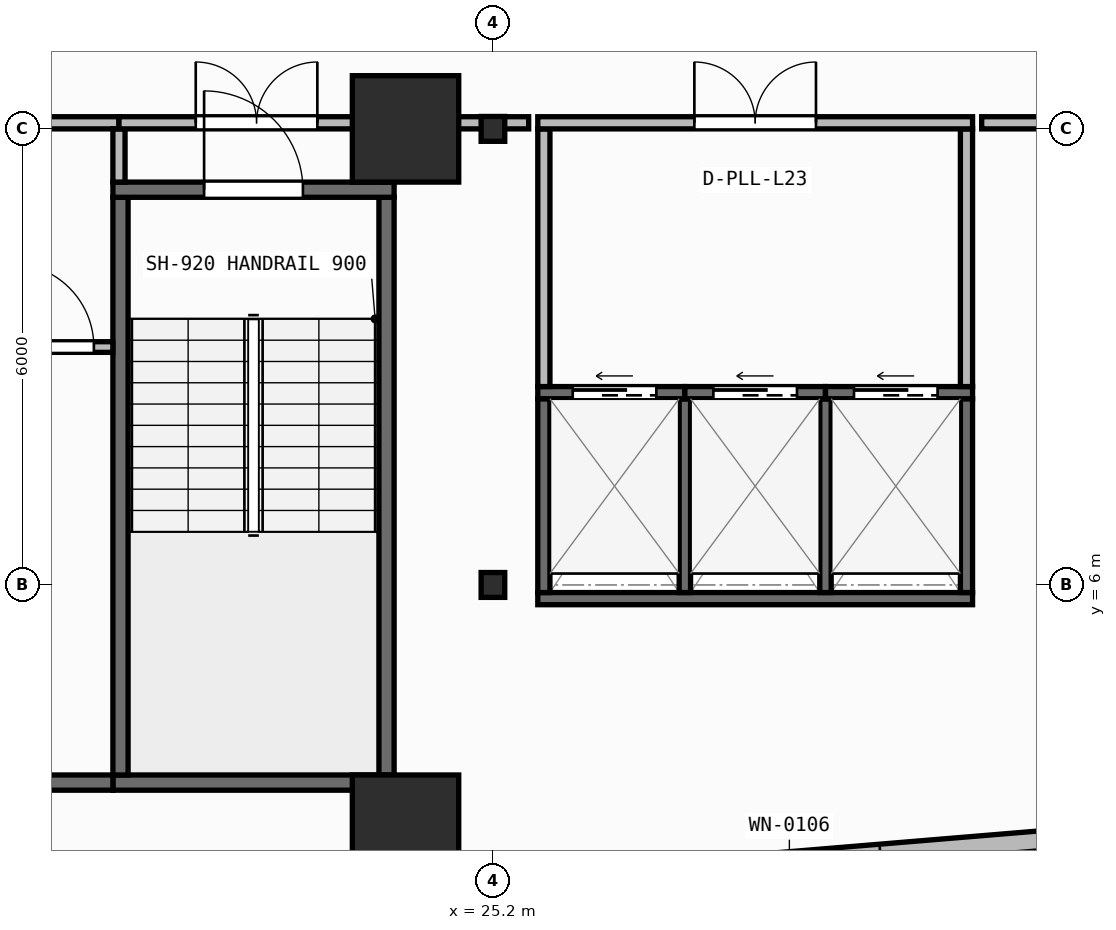
"""IFC4 building model, lengths in metres.
Left out: names, types, materials, properties, quantities, classifications, styles, units other than length and angle.
Written with IfcOpenShell. Run it as: python <this file> out.ifc"""

import sys

from ifc_helpers import new_model, si_unit, direction, frame, frame_2d, origin, origin_2d, place, context, subcontext, project, spatial, rectangle, i_section, extrude, element, fill, save


model = new_model("IFC4")
c1 = context("Model", 3, precision=1e-05, world=origin(), true_north=direction((0.0, 1.0)))
c2 = subcontext(c1, "Body", "Model", "MODEL_VIEW")
j1 = project(units=[si_unit("LENGTHUNIT", "METRE"), si_unit("PLANEANGLEUNIT", "RADIAN")], contexts=[c1])
p1 = place(None, origin())
s1 = spatial("IfcSite", under=j1, at=p1, CompositionType="ELEMENT")
p2 = place(p1, origin())
s2 = spatial("IfcBuilding", under=s1, at=p2, CompositionType="ELEMENT")
p3 = place(p2, frame((0.0, 0.0, 93.6)))
s3 = spatial("IfcBuildingStorey", under=s2, at=p3, CompositionType="ELEMENT", Elevation=93.6)
p4 = place(p3, frame((24.05, 2.8, 0.0), z_axis=(0.0, 0.0, 1.0), x_axis=(1.0, 0.0, 0.0)))
e1 = element("IfcColumn", 1, at=p4, inside=s3, PredefinedType="COLUMN", context=c2, shape_type="SweptSolid", body=[
    extrude(rectangle(XDim=1.4, YDim=1.4, at=origin_2d()), origin(), (0.0, 0.0, 1.0), 3.95),
])
p5 = place(p3, frame((25.2, 6.0, 0.0), z_axis=(0.0, 0.0, 1.0), x_axis=(1.0, 0.0, 0.0)))
e2 = element("IfcColumn", 2, at=p5, inside=s3, PredefinedType="COLUMN", context=c2, shape_type="SweptSolid", body=[
    extrude(i_section(OverallWidth=0.311, OverallDepth=0.327, WebThickness=0.016, FlangeThickness=0.025, FilletRadius=0.017, at=origin_2d()), origin(), (0.0, 0.0, 1.0), 3.95),
])
p6 = place(p3, frame((24.05, 12.0, 0.0), z_axis=(0.0, 0.0, 1.0), x_axis=(1.0, 0.0, 0.0)))
e3 = element("IfcColumn", 3, at=p6, inside=s3, PredefinedType="COLUMN", context=c2, shape_type="SweptSolid", body=[
    extrude(rectangle(XDim=1.4, YDim=1.4, at=origin_2d()), origin(), (0.0, 0.0, 1.0), 3.95),
])
p7 = place(p3, frame((25.2, 12.0, 0.0), z_axis=(0.0, 0.0, 1.0), x_axis=(1.0, 0.0, 0.0)))
e4 = element("IfcColumn", 4, at=p7, inside=s3, PredefinedType="COLUMN", context=c2, shape_type="SweptSolid", body=[
    extrude(i_section(OverallWidth=0.311, OverallDepth=0.327, WebThickness=0.016, FlangeThickness=0.025, FilletRadius=0.017, at=origin_2d()), origin(), (0.0, 0.0, 1.0), 3.95),
])
p8 = place(p3, frame((2.76, 0.174, 0.0), z_axis=(0.0, 0.0, 1.0), x_axis=(0.996571478456, 0.082736257641, 0.0)))
e5 = element("IfcWall", 5, at=p8, inside=s3, PredefinedType="STANDARD", context=c2, shape_type="SweptSolid", body=[
    extrude(rectangle(XDim=52.861, YDim=0.26, at=frame_2d((26.431, 0.0))), origin(), (0.0, 0.0, 1.0), 3.67),
])
p9 = place(p8, frame((25.231, 0.0, 0.9)))
e6 = element("IfcOpeningElement", 6, at=p9, cuts=e5, PredefinedType="OPENING", context=c2, shape_type="SweptSolid", body=[
    extrude(rectangle(XDim=2.4, YDim=1.65, at=frame_2d((1.2, 0.825))), frame((0.0, 0.14, 0.0), z_axis=(0.0, -1.0, 0.0), x_axis=(1.0, 0.0, 0.0)), (0.0, 0.0, 1.0), 0.28),
])
p10 = place(p3, frame((20.2, 3.4, 0.0), z_axis=(0.0, 0.0, 1.0), x_axis=(1.0, 0.0, 0.0)))
e7 = element("IfcWall", 7, at=p10, inside=s3, PredefinedType="SHEAR", context=c2, shape_type="SweptSolid", body=[
    extrude(rectangle(XDim=3.7, YDim=0.2, at=frame_2d((1.85, 0.0))), origin(), (0.0, 0.0, 1.0), 3.67),
])
for number, where, z_axis, x_axis in (
    (8, (20.3, 3.5, 0.0), (0.0, 0.0, 1.0), (0.0, 1.0, 0.0)),
    (9, (23.8, 3.5, 0.0), (0.0, 0.0, 1.0), (0.0, 1.0, 0.0)),
):
    element("IfcWall", number, at=place(p3, frame(where, z_axis=z_axis, x_axis=x_axis)), inside=s3, PredefinedType="SHEAR", context=c2, shape_type="SweptSolid", body=[
        extrude(rectangle(XDim=7.6, YDim=0.2, at=frame_2d((3.8, 0.0))), origin(), (0.0, 0.0, 1.0), 3.67),
    ])
p11 = place(p3, frame((20.2, 11.2, 0.0), z_axis=(0.0, 0.0, 1.0), x_axis=(1.0, 0.0, 0.0)))
e10 = element("IfcWall", 10, at=p11, inside=s3, PredefinedType="SHEAR", context=c2, shape_type="SweptSolid", body=[
    extrude(rectangle(XDim=3.7, YDim=0.2, at=frame_2d((1.85, 0.0))), origin(), (0.0, 0.0, 1.0), 3.67),
])
p12 = place(p11, frame((1.2, 0.0, 0.0)))
e11 = element("IfcOpeningElement", 11, at=p12, cuts=e10, PredefinedType="OPENING", context=c2, shape_type="SweptSolid", body=[
    extrude(rectangle(XDim=1.3, YDim=2.15, at=frame_2d((0.65, 1.075))), frame((0.0, 0.11, 0.0), z_axis=(0.0, -1.0, 0.0), x_axis=(1.0, 0.0, 0.0)), (0.0, 0.0, 1.0), 0.22),
])
p13 = place(p3, frame((6.5, 3.4, 0.0), z_axis=(0.0, 0.0, 1.0), x_axis=(1.0, 0.0, 0.0)))
e12 = element("IfcWall", 12, at=p13, inside=s3, PredefinedType="SHEAR", context=c2, shape_type="SweptSolid", body=[
    extrude(rectangle(XDim=13.7, YDim=0.2, at=frame_2d((6.85, 0.0))), origin(), (0.0, 0.0, 1.0), 3.67),
])
p14 = place(p3, frame((25.79, 5.82, 0.0), z_axis=(0.0, 0.0, 1.0), x_axis=(1.0, 0.0, 0.0)))
e13 = element("IfcWall", 13, at=p14, inside=s3, PredefinedType="SHEAR", context=c2, shape_type="SweptSolid", body=[
    extrude(rectangle(XDim=5.72, YDim=0.16, at=frame_2d((2.86, 0.0))), origin(), (0.0, 0.0, 1.0), 3.67),
])
for number, where, z_axis, x_axis in (
    (14, (25.87, 5.9, 0.0), (0.0, 0.0, 1.0), (0.0, 1.0, 0.0)),
    (15, (31.43, 5.9, 0.0), (0.0, 0.0, 1.0), (0.0, 1.0, 0.0)),
):
    element("IfcWall", number, at=place(p3, frame(where, z_axis=z_axis, x_axis=x_axis)), inside=s3, PredefinedType="SHEAR", context=c2, shape_type="SweptSolid", body=[
        extrude(rectangle(XDim=2.55, YDim=0.16, at=frame_2d((1.275, 0.0))), origin(), (0.0, 0.0, 1.0), 3.67),
    ])
for number, where, z_axis, x_axis in (
    (16, (27.725, 5.9, 0.0), (0.0, 0.0, 1.0), (0.0, 1.0, 0.0)),
    (17, (29.575, 5.9, 0.0), (0.0, 0.0, 1.0), (0.0, 1.0, 0.0)),
):
    element("IfcWall", number, at=place(p3, frame(where, z_axis=z_axis, x_axis=x_axis)), inside=s3, PredefinedType="SHEAR", context=c2, shape_type="SweptSolid", body=[
        extrude(rectangle(XDim=2.55, YDim=0.15, at=frame_2d((1.275, 0.0))), origin(), (0.0, 0.0, 1.0), 3.67),
    ])
p15 = place(p3, frame((25.79, 8.53, 0.0), z_axis=(0.0, 0.0, 1.0), x_axis=(1.0, 0.0, 0.0)))
e18 = element("IfcWall", 18, at=p15, inside=s3, PredefinedType="SHEAR", context=c2, shape_type="SweptSolid", body=[
    extrude(rectangle(XDim=1.935, YDim=0.16, at=frame_2d((0.968, 0.0))), origin(), (0.0, 0.0, 1.0), 3.67),
])
p16 = place(p15, frame((0.46, 0.0, 0.0)))
e19 = element("IfcOpeningElement", 19, at=p16, cuts=e18, PredefinedType="OPENING", context=c2, shape_type="SweptSolid", body=[
    extrude(rectangle(XDim=1.1, YDim=2.15, at=frame_2d((0.55, 1.075))), frame((0.0, 0.09, 0.0), z_axis=(0.0, -1.0, 0.0), x_axis=(1.0, 0.0, 0.0)), (0.0, 0.0, 1.0), 0.18),
])
p17 = place(p3, frame((27.725, 8.53, 0.0), z_axis=(0.0, 0.0, 1.0), x_axis=(1.0, 0.0, 0.0)))
e20 = element("IfcWall", 20, at=p17, inside=s3, PredefinedType="SHEAR", context=c2, shape_type="SweptSolid", body=[
    extrude(rectangle(XDim=1.85, YDim=0.16, at=frame_2d((0.925, 0.0))), origin(), (0.0, 0.0, 1.0), 3.67),
])
p18 = place(p17, frame((0.375, 0.0, 0.0)))
e21 = element("IfcOpeningElement", 21, at=p18, cuts=e20, PredefinedType="OPENING", context=c2, shape_type="SweptSolid", body=[
    extrude(rectangle(XDim=1.1, YDim=2.15, at=frame_2d((0.55, 1.075))), frame((0.0, 0.09, 0.0), z_axis=(0.0, -1.0, 0.0), x_axis=(1.0, 0.0, 0.0)), (0.0, 0.0, 1.0), 0.18),
])
p19 = place(p3, frame((29.575, 8.53, 0.0), z_axis=(0.0, 0.0, 1.0), x_axis=(1.0, 0.0, 0.0)))
e22 = element("IfcWall", 22, at=p19, inside=s3, PredefinedType="SHEAR", context=c2, shape_type="SweptSolid", body=[
    extrude(rectangle(XDim=1.935, YDim=0.16, at=frame_2d((0.968, 0.0))), origin(), (0.0, 0.0, 1.0), 3.67),
])
p20 = place(p19, frame((0.375, 0.0, 0.0)))
e23 = element("IfcOpeningElement", 23, at=p20, cuts=e22, PredefinedType="OPENING", context=c2, shape_type="SweptSolid", body=[
    extrude(rectangle(XDim=1.1, YDim=2.15, at=frame_2d((0.55, 1.075))), frame((0.0, 0.09, 0.0), z_axis=(0.0, -1.0, 0.0), x_axis=(1.0, 0.0, 0.0)), (0.0, 0.0, 1.0), 0.18),
])
p21 = place(p3, frame((18.61, 9.13, 0.0), z_axis=(0.0, 0.0, 1.0), x_axis=(1.0, 0.0, 0.0)))
e24 = element("IfcWall", 24, at=p21, inside=s3, PredefinedType="PARTITIONING", context=c2, shape_type="SweptSolid", body=[
    extrude(rectangle(XDim=1.59, YDim=0.14, at=frame_2d((0.795, 0.0))), origin(), (0.0, 0.0, 1.0), 3.67),
])
p22 = place(p21, frame((0.24, 0.0, 0.0)))
e25 = element("IfcOpeningElement", 25, at=p22, cuts=e24, PredefinedType="OPENING", context=c2, shape_type="SweptSolid", body=[
    extrude(rectangle(XDim=1.1, YDim=2.1, at=frame_2d((0.55, 1.05))), frame((0.0, 0.08, 0.0), z_axis=(0.0, -1.0, 0.0), x_axis=(1.0, 0.0, 0.0)), (0.0, 0.0, 1.0), 0.16),
])
p23 = place(p3, frame((12.58, 12.08, 0.0), z_axis=(0.0, 0.0, 1.0), x_axis=(1.0, 0.0, 0.0)))
e26 = element("IfcWall", 26, at=p23, inside=s3, PredefinedType="PARTITIONING", context=c2, shape_type="SweptSolid", body=[
    extrude(rectangle(XDim=7.7, YDim=0.16, at=frame_2d((3.85, 0.0))), origin(), (0.0, 0.0, 1.0), 3.033),
])
p24 = place(p23, frame((3.05, 0.0, 0.0)))
e27 = element("IfcOpeningElement", 27, at=p24, cuts=e26, PredefinedType="OPENING", context=c2, shape_type="SweptSolid", body=[
    extrude(rectangle(XDim=1.6, YDim=2.05, at=frame_2d((0.8, 1.025))), frame((0.0, 0.09, 0.0), z_axis=(0.0, -1.0, 0.0), x_axis=(1.0, 0.0, 0.0)), (0.0, 0.0, 1.0), 0.18),
])
p25 = place(p3, frame((20.28, 11.3, 0.0), z_axis=(0.0, 0.0, 1.0), x_axis=(0.0, 1.0, 0.0)))
e28 = element("IfcWall", 28, at=p25, inside=s3, PredefinedType="PARTITIONING", context=c2, shape_type="SweptSolid", body=[
    extrude(rectangle(XDim=0.7, YDim=0.16, at=frame_2d((0.35, 0.0))), origin(), (0.0, 0.0, 1.0), 3.67),
])
p26 = place(p3, frame((20.28, 12.08, 0.0), z_axis=(0.0, 0.0, 1.0), x_axis=(1.0, 0.0, 0.0)))
e29 = element("IfcWall", 29, at=p26, inside=s3, PredefinedType="PARTITIONING", context=c2, shape_type="SweptSolid", body=[
    extrude(rectangle(XDim=3.62, YDim=0.16, at=frame_2d((1.81, 0.0))), origin(), (0.0, 0.0, 1.0), 3.033),
])
p27 = place(p26, frame((1.01, 0.0, 0.0)))
e30 = element("IfcOpeningElement", 30, at=p27, cuts=e29, PredefinedType="OPENING", context=c2, shape_type="SweptSolid", body=[
    extrude(rectangle(XDim=1.6, YDim=2.05, at=frame_2d((0.8, 1.025))), frame((0.0, 0.09, 0.0), z_axis=(0.0, -1.0, 0.0), x_axis=(1.0, 0.0, 0.0)), (0.0, 0.0, 1.0), 0.18),
])
p28 = place(p3, frame((23.82, 11.3, 0.0), z_axis=(0.0, 0.0, 1.0), x_axis=(0.0, 1.0, 0.0)))
e31 = element("IfcWall", 31, at=p28, inside=s3, PredefinedType="PARTITIONING", context=c2, shape_type="SweptSolid", body=[
    extrude(rectangle(XDim=0.7, YDim=0.16, at=frame_2d((0.35, 0.0))), origin(), (0.0, 0.0, 1.0), 3.67),
])
for number, where, z_axis, x_axis in (
    (32, (25.87, 8.61, 0.0), (0.0, 0.0, 1.0), (0.0, 1.0, 0.0)),
    (33, (31.43, 8.61, 0.0), (0.0, 0.0, 1.0), (0.0, 1.0, 0.0)),
):
    element("IfcWall", number, at=place(p3, frame(where, z_axis=z_axis, x_axis=x_axis)), inside=s3, PredefinedType="PARTITIONING", context=c2, shape_type="SweptSolid", body=[
        extrude(rectangle(XDim=3.39, YDim=0.16, at=frame_2d((1.695, 0.0))), origin(), (0.0, 0.0, 1.0), 3.67),
    ])
p29 = place(p3, frame((25.79, 12.08, 0.0), z_axis=(0.0, 0.0, 1.0), x_axis=(1.0, 0.0, 0.0)))
e34 = element("IfcWall", 34, at=p29, inside=s3, PredefinedType="PARTITIONING", context=c2, shape_type="SweptSolid", body=[
    extrude(rectangle(XDim=5.72, YDim=0.16, at=frame_2d((2.86, 0.0))), origin(), (0.0, 0.0, 1.0), 3.033),
])
p30 = place(p29, frame((2.06, 0.0, 0.0)))
e35 = element("IfcOpeningElement", 35, at=p30, cuts=e34, PredefinedType="OPENING", context=c2, shape_type="SweptSolid", body=[
    extrude(rectangle(XDim=1.6, YDim=2.05, at=frame_2d((0.8, 1.025))), frame((0.0, 0.09, 0.0), z_axis=(0.0, -1.0, 0.0), x_axis=(1.0, 0.0, 0.0)), (0.0, 0.0, 1.0), 0.18),
])
p31 = place(p3, frame((24.02, 12.08, 0.0), z_axis=(0.0, 0.0, 1.0), x_axis=(1.0, 0.0, 0.0)))
e36 = element("IfcWall", 36, at=p31, inside=s3, PredefinedType="PARTITIONING", context=c2, shape_type="SweptSolid", body=[
    extrude(rectangle(XDim=1.65, YDim=0.16, at=frame_2d((0.825, 0.0))), origin(), (0.0, 0.0, 1.0), 3.033),
])
p32 = place(p3, frame((31.63, 12.08, 0.0), z_axis=(0.0, 0.0, 1.0), x_axis=(1.0, 0.0, 0.0)))
e37 = element("IfcWall", 37, at=p32, inside=s3, PredefinedType="PARTITIONING", context=c2, shape_type="SweptSolid", body=[
    extrude(rectangle(XDim=11.181, YDim=0.16, at=frame_2d((5.59, 0.0))), origin(), (0.0, 0.0, 1.0), 3.033),
])
p33 = place(p12, origin())
e38 = element("IfcDoor", 38, at=p33, inside=s3, OperationType="SINGLE_SWING_LEFT", PredefinedType="DOOR", context=c2, shape_type="SweptSolid", body=[
    extrude(rectangle(XDim=1.3, YDim=2.15, at=frame_2d((0.65, 1.075))), frame((0.0, 0.025, 0.0), z_axis=(0.0, -1.0, 0.0), x_axis=(1.0, 0.0, 0.0)), (0.0, 0.0, 1.0), 0.05),
])
fill(e11, e38)
p34 = place(p16, origin())
e39 = element("IfcDoor", 39, at=p34, inside=s3, OperationType="SLIDING_TO_LEFT", PredefinedType="DOOR", context=c2, shape_type="SweptSolid", body=[
    extrude(rectangle(XDim=1.1, YDim=2.15, at=frame_2d((0.55, 1.075))), frame((0.0, 0.025, 0.0), z_axis=(0.0, -1.0, 0.0), x_axis=(1.0, 0.0, 0.0)), (0.0, 0.0, 1.0), 0.05),
])
fill(e19, e39)
p35 = place(p18, origin())
e40 = element("IfcDoor", 40, at=p35, inside=s3, OperationType="SLIDING_TO_LEFT", PredefinedType="DOOR", context=c2, shape_type="SweptSolid", body=[
    extrude(rectangle(XDim=1.1, YDim=2.15, at=frame_2d((0.55, 1.075))), frame((0.0, 0.025, 0.0), z_axis=(0.0, -1.0, 0.0), x_axis=(1.0, 0.0, 0.0)), (0.0, 0.0, 1.0), 0.05),
])
fill(e21, e40)
p36 = place(p20, origin())
e41 = element("IfcDoor", 41, at=p36, inside=s3, OperationType="SLIDING_TO_LEFT", PredefinedType="DOOR", context=c2, shape_type="SweptSolid", body=[
    extrude(rectangle(XDim=1.1, YDim=2.15, at=frame_2d((0.55, 1.075))), frame((0.0, 0.025, 0.0), z_axis=(0.0, -1.0, 0.0), x_axis=(1.0, 0.0, 0.0)), (0.0, 0.0, 1.0), 0.05),
])
fill(e23, e41)
p37 = place(p22, origin())
e42 = element("IfcDoor", 42, at=p37, inside=s3, OperationType="SINGLE_SWING_LEFT", PredefinedType="DOOR", context=c2, shape_type="SweptSolid", body=[
    extrude(rectangle(XDim=1.1, YDim=2.1, at=frame_2d((0.55, 1.05))), frame((0.0, 0.025, 0.0), z_axis=(0.0, -1.0, 0.0), x_axis=(1.0, 0.0, 0.0)), (0.0, 0.0, 1.0), 0.05),
])
fill(e25, e42)
p38 = place(p27, origin())
e43 = element("IfcDoor", 43, at=p38, inside=s3, OperationType="DOUBLE_DOOR_SINGLE_SWING", PredefinedType="DOOR", context=c2, shape_type="SweptSolid", body=[
    extrude(rectangle(XDim=1.6, YDim=2.05, at=frame_2d((0.8, 1.025))), frame((0.0, 0.025, 0.0), z_axis=(0.0, -1.0, 0.0), x_axis=(1.0, 0.0, 0.0)), (0.0, 0.0, 1.0), 0.05),
])
fill(e30, e43)
p39 = place(p30, origin())
e44 = element("IfcDoor", 44, at=p39, inside=s3, OperationType="DOUBLE_DOOR_SINGLE_SWING", PredefinedType="DOOR", context=c2, shape_type="SweptSolid", body=[
    extrude(rectangle(XDim=1.6, YDim=2.05, at=frame_2d((0.8, 1.025))), frame((0.0, 0.025, 0.0), z_axis=(0.0, -1.0, 0.0), x_axis=(1.0, 0.0, 0.0)), (0.0, 0.0, 1.0), 0.05),
])
fill(e35, e44)
save(model, sys.argv[1])
